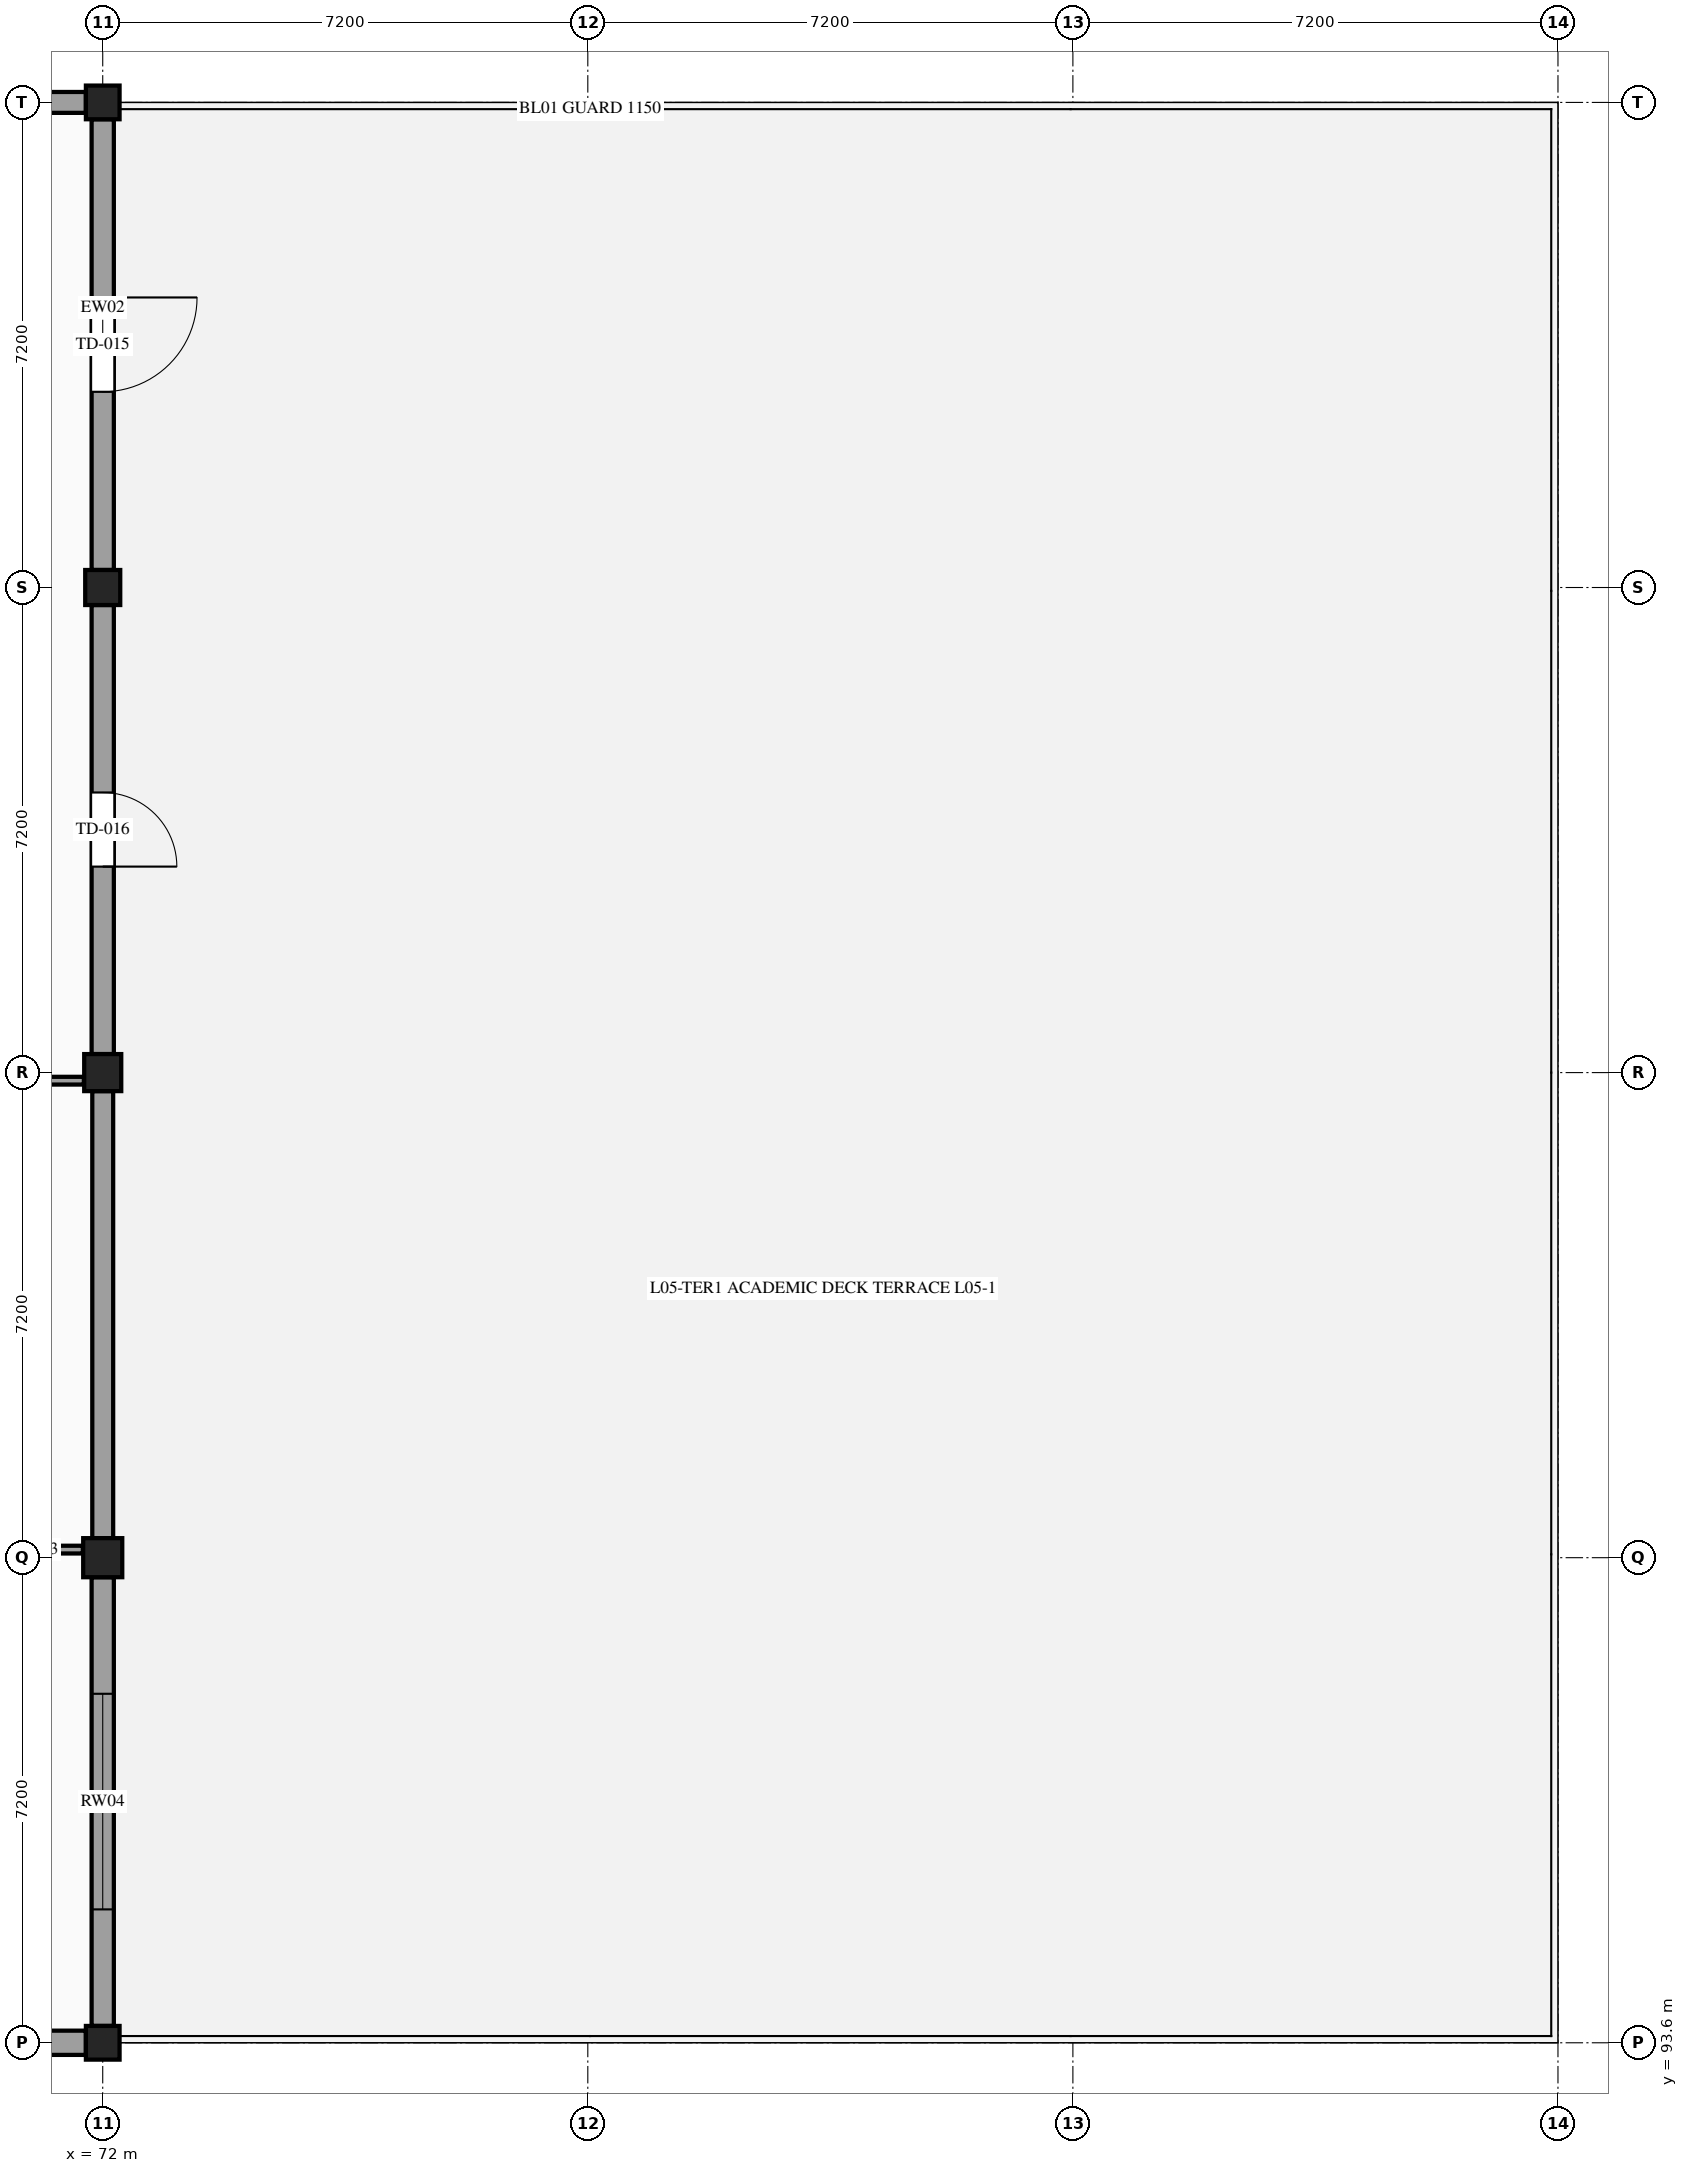
"""IFC4 building model, lengths in metres.
Left out: names, types, materials, properties, quantities, classifications, styles, units other than length and angle.
Written with IfcOpenShell. Run it as: python <this file> out.ifc"""

import sys

from ifc_helpers import new_model, si_unit, direction, frame, frame_2d, origin, origin_2d, place, context, subcontext, project, spatial, rectangle, extrude, element, fill, save


model = new_model("IFC4")
c1 = context("Model", 3, precision=1e-05, world=origin(), true_north=direction((0.0, 1.0)))
c2 = subcontext(c1, "Body", "Model", "MODEL_VIEW")
j1 = project(units=[si_unit("LENGTHUNIT", "METRE"), si_unit("PLANEANGLEUNIT", "RADIAN")], contexts=[c1])
p1 = place(None, origin())
s1 = spatial("IfcSite", under=j1, at=p1, CompositionType="ELEMENT")
p2 = place(p1, origin())
s2 = spatial("IfcBuilding", under=s1, at=p2, CompositionType="ELEMENT")
p3 = place(p2, frame((0.0, 0.0, 22.8)))
s3 = spatial("IfcBuildingStorey", under=s2, at=p3, CompositionType="ELEMENT", Elevation=22.8)
p4 = place(p3, frame((72.0, 93.6, 0.0), z_axis=(0.0, 0.0, 1.0), x_axis=(1.0, 0.0, 0.0)))
e1 = element("IfcColumn", 1, at=p4, inside=s3, PredefinedType="COLUMN", context=c2, shape_type="SweptSolid", body=[
    extrude(rectangle(XDim=0.5, YDim=0.5, at=origin_2d()), origin(), (0.0, 0.0, 1.0), 3.9),
])
p5 = place(p3, frame((72.0, 100.8, 0.0), z_axis=(0.0, 0.0, 1.0), x_axis=(1.0, 0.0, 0.0)))
e2 = element("IfcColumn", 2, at=p5, inside=s3, PredefinedType="COLUMN", context=c2, shape_type="SweptSolid", body=[
    extrude(rectangle(XDim=0.58, YDim=0.58, at=origin_2d()), origin(), (0.0, 0.0, 1.0), 3.9),
])
p6 = place(p3, frame((72.0, 108.0, 0.0), z_axis=(0.0, 0.0, 1.0), x_axis=(1.0, 0.0, 0.0)))
e3 = element("IfcColumn", 3, at=p6, inside=s3, PredefinedType="COLUMN", context=c2, shape_type="SweptSolid", body=[
    extrude(rectangle(XDim=0.55, YDim=0.55, at=origin_2d()), origin(), (0.0, 0.0, 1.0), 3.9),
])
p7 = place(p3, frame((72.0, 115.2, 0.0), z_axis=(0.0, 0.0, 1.0), x_axis=(1.0, 0.0, 0.0)))
e4 = element("IfcColumn", 4, at=p7, inside=s3, PredefinedType="COLUMN", context=c2, shape_type="SweptSolid", body=[
    extrude(rectangle(XDim=0.52, YDim=0.52, at=origin_2d()), origin(), (0.0, 0.0, 1.0), 3.9),
])
p8 = place(p3, frame((72.0, 122.4, 0.0), z_axis=(0.0, 0.0, 1.0), x_axis=(1.0, 0.0, 0.0)))
e5 = element("IfcColumn", 5, at=p8, inside=s3, PredefinedType="COLUMN", context=c2, shape_type="SweptSolid", body=[
    extrude(rectangle(XDim=0.5, YDim=0.5, at=origin_2d()), origin(), (0.0, 0.0, 1.0), 3.9),
])
p9 = place(p3, frame((65.09, 122.4, 0.0), z_axis=(0.0, 0.0, 1.0), x_axis=(1.0, 0.0, 0.0)))
e6 = element("IfcWall", 6, at=p9, inside=s3, PredefinedType="STANDARD", context=c2, shape_type="SweptSolid", body=[
    extrude(rectangle(XDim=6.66, YDim=0.31, at=frame_2d((3.33, 0.0))), origin(), (0.0, 0.0, 1.0), 3.095),
])
p10 = place(p9, frame((0.93, 0.0, 0.98)))
e7 = element("IfcOpeningElement", 7, at=p10, cuts=e6, PredefinedType="OPENING", context=c2, shape_type="SweptSolid", body=[
    extrude(rectangle(XDim=4.8, YDim=1.8, at=frame_2d((2.4, 0.9))), frame((0.0, 0.165, 0.0), z_axis=(0.0, -1.0, 0.0), x_axis=(1.0, 0.0, 0.0)), (0.0, 0.0, 1.0), 0.33),
])
p11 = place(p3, frame((72.0, 122.15, 0.0), z_axis=(0.0, 0.0, 1.0), x_axis=(0.0, -1.0, 0.0)))
e8 = element("IfcWall", 8, at=p11, inside=s3, PredefinedType="STANDARD", context=c2, shape_type="SweptSolid", body=[
    extrude(rectangle(XDim=6.69, YDim=0.33, at=frame_2d((3.345, 0.0))), origin(), (0.0, 0.0, 1.0), 3.095),
])
p12 = place(p11, frame((2.645, 0.0, 0.0)))
e9 = element("IfcOpeningElement", 9, at=p12, cuts=e8, PredefinedType="OPENING", context=c2, shape_type="SweptSolid", body=[
    extrude(rectangle(XDim=1.4, YDim=2.25, at=frame_2d((0.7, 1.125))), frame((0.0, 0.175, 0.0), z_axis=(0.0, -1.0, 0.0), x_axis=(1.0, 0.0, 0.0)), (0.0, 0.0, 1.0), 0.35),
])
p13 = place(p3, frame((72.0, 114.94, 0.0), z_axis=(0.0, 0.0, 1.0), x_axis=(0.0, -1.0, 0.0)))
e10 = element("IfcWall", 10, at=p13, inside=s3, PredefinedType="STANDARD", context=c2, shape_type="SweptSolid", body=[
    extrude(rectangle(XDim=6.665, YDim=0.33, at=frame_2d((3.333, 0.0))), origin(), (0.0, 0.0, 1.0), 3.095),
])
p14 = place(p13, frame((2.782, 0.0, 0.0)))
e11 = element("IfcOpeningElement", 11, at=p14, cuts=e10, PredefinedType="OPENING", context=c2, shape_type="SweptSolid", body=[
    extrude(rectangle(XDim=1.1, YDim=2.2, at=frame_2d((0.55, 1.1))), frame((0.0, 0.175, 0.0), z_axis=(0.0, -1.0, 0.0), x_axis=(1.0, 0.0, 0.0)), (0.0, 0.0, 1.0), 0.35),
])
p15 = place(p3, frame((72.0, 107.725, 0.0), z_axis=(0.0, 0.0, 1.0), x_axis=(0.0, -1.0, 0.0)))
e12 = element("IfcWall", 12, at=p15, inside=s3, PredefinedType="STANDARD", context=c2, shape_type="SweptSolid", body=[
    extrude(rectangle(XDim=6.635, YDim=0.31, at=frame_2d((3.317, 0.0))), origin(), (0.0, 0.0, 1.0), 3.095),
])
p16 = place(p3, frame((72.0, 100.51, 0.0), z_axis=(0.0, 0.0, 1.0), x_axis=(0.0, -1.0, 0.0)))
e13 = element("IfcWall", 13, at=p16, inside=s3, PredefinedType="STANDARD", context=c2, shape_type="SweptSolid", body=[
    extrude(rectangle(XDim=6.66, YDim=0.33, at=frame_2d((3.33, 0.0))), origin(), (0.0, 0.0, 1.0), 3.095),
])
p17 = place(p16, frame((1.73, 0.0, 0.95)))
e14 = element("IfcOpeningElement", 14, at=p17, cuts=e13, PredefinedType="OPENING", context=c2, shape_type="SweptSolid", body=[
    extrude(rectangle(XDim=3.2, YDim=1.45, at=frame_2d((1.6, 0.725))), frame((0.0, 0.175, 0.0), z_axis=(0.0, -1.0, 0.0), x_axis=(1.0, 0.0, 0.0)), (0.0, 0.0, 1.0), 0.35),
])
p18 = place(p3, frame((71.75, 93.6, 0.0), z_axis=(0.0, 0.0, 1.0), x_axis=(-1.0, 0.0, 0.0)))
e15 = element("IfcWall", 15, at=p18, inside=s3, PredefinedType="STANDARD", context=c2, shape_type="SweptSolid", body=[
    extrude(rectangle(XDim=6.66, YDim=0.36, at=frame_2d((3.33, 0.0))), origin(), (0.0, 0.0, 1.0), 3.095),
])
p19 = place(p18, frame((1.248, 0.0, 1.15)))
e16 = element("IfcOpeningElement", 16, at=p19, cuts=e15, PredefinedType="OPENING", context=c2, shape_type="SweptSolid", body=[
    extrude(rectangle(XDim=1.5, YDim=1.2, at=frame_2d((0.75, 0.6))), frame((0.0, 0.19, 0.0), z_axis=(0.0, -1.0, 0.0), x_axis=(1.0, 0.0, 0.0)), (0.0, 0.0, 1.0), 0.38),
])
p20 = place(p18, frame((3.912, 0.0, 1.15)))
e17 = element("IfcOpeningElement", 17, at=p20, cuts=e15, PredefinedType="OPENING", context=c2, shape_type="SweptSolid", body=[
    extrude(rectangle(XDim=1.5, YDim=1.2, at=frame_2d((0.75, 0.6))), frame((0.0, 0.19, 0.0), z_axis=(0.0, -1.0, 0.0), x_axis=(1.0, 0.0, 0.0)), (0.0, 0.0, 1.0), 0.38),
])
p21 = place(p3, frame((65.08, 100.92, 0.0), z_axis=(0.0, 0.0, 1.0), x_axis=(1.0, 0.0, 0.0)))
e18 = element("IfcWall", 18, at=p21, inside=s3, PredefinedType="PARTITIONING", context=c2, shape_type="SweptSolid", body=[
    extrude(rectangle(XDim=6.625, YDim=0.115, at=frame_2d((3.312, 0.0))), origin(), (0.0, 0.0, 1.0), 3.18),
])
p22 = place(p21, frame((0.72, 0.0, 0.0)))
e19 = element("IfcOpeningElement", 19, at=p22, cuts=e18, PredefinedType="OPENING", context=c2, shape_type="SweptSolid", body=[
    extrude(rectangle(XDim=0.95, YDim=2.1, at=frame_2d((0.475, 1.05))), frame((0.0, 0.067, 0.0), z_axis=(0.0, -1.0, 0.0), x_axis=(1.0, 0.0, 0.0)), (0.0, 0.0, 1.0), 0.135),
])
p23 = place(p21, frame((2.82, 0.0, 0.0)))
e20 = element("IfcOpeningElement", 20, at=p23, cuts=e18, PredefinedType="OPENING", context=c2, shape_type="SweptSolid", body=[
    extrude(rectangle(XDim=0.95, YDim=2.1, at=frame_2d((0.475, 1.05))), frame((0.0, 0.067, 0.0), z_axis=(0.0, -1.0, 0.0), x_axis=(1.0, 0.0, 0.0)), (0.0, 0.0, 1.0), 0.135),
])
p24 = place(p21, frame((4.97, 0.0, 0.0)))
e21 = element("IfcOpeningElement", 21, at=p24, cuts=e18, PredefinedType="OPENING", context=c2, shape_type="SweptSolid", body=[
    extrude(rectangle(XDim=1.0, YDim=2.15, at=frame_2d((0.5, 1.075))), frame((0.0, 0.067, 0.0), z_axis=(0.0, -1.0, 0.0), x_axis=(1.0, 0.0, 0.0)), (0.0, 0.0, 1.0), 0.135),
])
p25 = place(p3, frame((65.065, 107.88, 0.0), z_axis=(0.0, 0.0, 1.0), x_axis=(1.0, 0.0, 0.0)))
e22 = element("IfcWall", 22, at=p25, inside=s3, PredefinedType="PARTITIONING", context=c2, shape_type="SweptSolid", body=[
    extrude(rectangle(XDim=6.655, YDim=0.115, at=frame_2d((3.328, 0.0))), origin(), (0.0, 0.0, 1.0), 3.18),
])
p26 = place(p12, origin())
e23 = element("IfcDoor", 23, at=p26, inside=s3, OperationType="SINGLE_SWING_LEFT", PredefinedType="DOOR", context=c2, shape_type="SweptSolid", body=[
    extrude(rectangle(XDim=1.4, YDim=2.25, at=frame_2d((0.7, 1.125))), frame((0.0, 0.025, 0.0), z_axis=(0.0, -1.0, 0.0), x_axis=(1.0, 0.0, 0.0)), (0.0, 0.0, 1.0), 0.05),
])
fill(e9, e23)
p27 = place(p14, origin())
e24 = element("IfcDoor", 24, at=p27, inside=s3, OperationType="SINGLE_SWING_RIGHT", PredefinedType="DOOR", context=c2, shape_type="SweptSolid", body=[
    extrude(rectangle(XDim=1.1, YDim=2.2, at=frame_2d((0.55, 1.1))), frame((0.0, 0.025, 0.0), z_axis=(0.0, -1.0, 0.0), x_axis=(1.0, 0.0, 0.0)), (0.0, 0.0, 1.0), 0.05),
])
fill(e11, e24)
p28 = place(p17, origin())
e25 = element("IfcWindow", 25, at=p28, inside=s3, PartitioningType="SINGLE_PANEL", PredefinedType="WINDOW", context=c2, shape_type="SweptSolid", body=[
    extrude(rectangle(XDim=3.2, YDim=1.45, at=frame_2d((1.6, 0.725))), frame((0.0, 0.03, 0.0), z_axis=(0.0, -1.0, 0.0), x_axis=(1.0, 0.0, 0.0)), (0.0, 0.0, 1.0), 0.06),
])
fill(e14, e25)
save(model, sys.argv[1])
